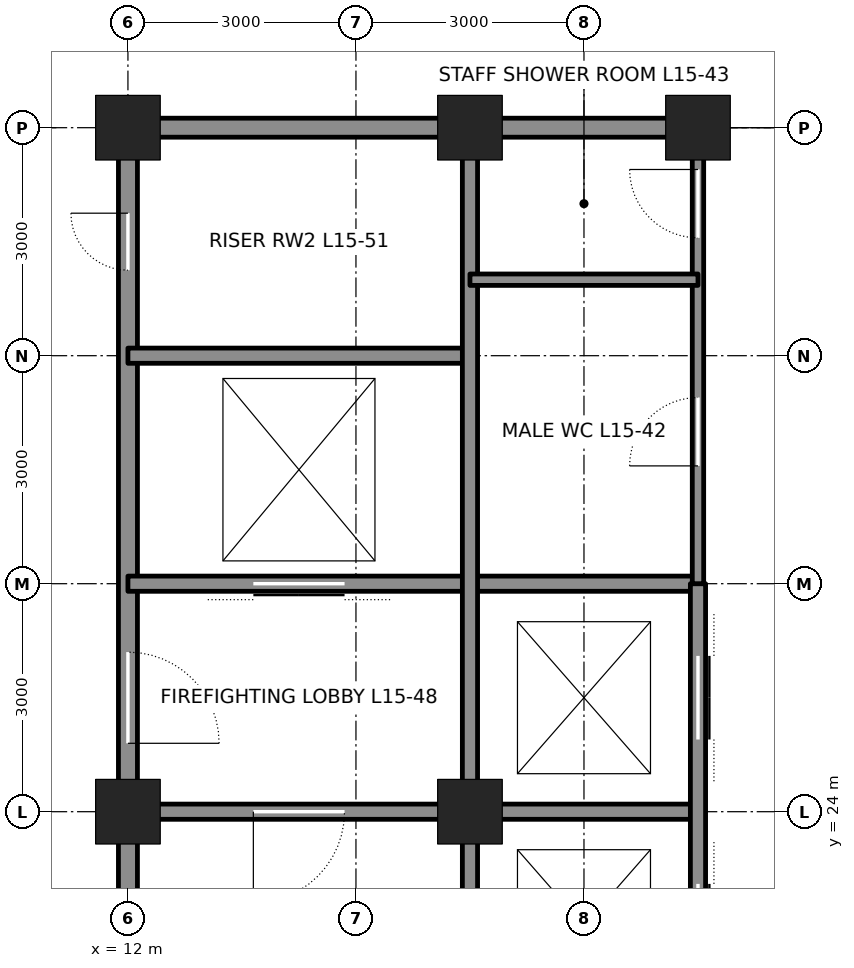
"""IFC4 building model, lengths in metres.
Left out: names, types, materials, properties, quantities, classifications, styles, units other than length and angle.
Written with IfcOpenShell. Run it as: python <this file> out.ifc"""

import sys

from ifc_helpers import new_model, si_unit, direction, frame, frame_2d, origin, origin_2d, place, context, subcontext, project, spatial, rectangle, hollow_rectangle, extrude, element, fill, save


model = new_model("IFC4")
c1 = context("Model", 3, precision=1e-05, world=origin(), true_north=direction((0.0, 1.0)))
c2 = subcontext(c1, "Body", "Model", "MODEL_VIEW")
j1 = project(units=[si_unit("LENGTHUNIT", "METRE"), si_unit("PLANEANGLEUNIT", "RADIAN")], contexts=[c1])
p1 = place(None, origin())
s1 = spatial("IfcSite", under=j1, at=p1, CompositionType="ELEMENT")
p2 = place(p1, origin())
s2 = spatial("IfcBuilding", under=s1, at=p2, CompositionType="ELEMENT")
p3 = place(p2, frame((0.0, 0.0, 73.8)))
s3 = spatial("IfcBuildingStorey", under=s2, at=p3, CompositionType="ELEMENT", Elevation=73.8)
for number, where, z_axis, x_axis in (
    (1, (12.0, 33.0, 0.0), (0.0, 0.0, 1.0), (1.0, 0.0, 0.0)),
    (2, (16.5, 33.0, 0.0), (0.0, 0.0, 1.0), (1.0, 0.0, 0.0)),
    (3, (19.5, 33.0, 0.0), (0.0, 0.0, 1.0), (1.0, 0.0, 0.0)),
    (4, (12.0, 24.0, 0.0), (0.0, 0.0, 1.0), (1.0, 0.0, 0.0)),
    (5, (16.5, 24.0, 0.0), (0.0, 0.0, 1.0), (1.0, 0.0, 0.0)),
):
    element("IfcColumn", number, at=place(p3, frame(where, z_axis=z_axis, x_axis=x_axis)), inside=s3, PredefinedType="COLUMN", context=c2, shape_type="SweptSolid", body=[
        extrude(hollow_rectangle(XDim=0.85, YDim=0.85, WallThickness=0.085, at=origin_2d()), origin(), (0.0, 0.0, 1.0), 4.5),
    ])
p4 = place(p3, frame((12.0, 21.25, 0.0), z_axis=(0.0, 0.0, 1.0), x_axis=(0.0, 1.0, 0.0)))
e6 = element("IfcWall", 6, at=p4, inside=s3, PredefinedType="SOLIDWALL", context=c2, shape_type="SweptSolid", body=[
    extrude(rectangle(XDim=2.5, YDim=0.25, at=frame_2d((1.25, 0.0))), origin(), (0.0, 0.0, 1.0), 3.113),
])
p5 = place(p3, frame((12.0, 24.25, 0.0), z_axis=(0.0, 0.0, 1.0), x_axis=(0.0, 1.0, 0.0)))
e7 = element("IfcWall", 7, at=p5, inside=s3, PredefinedType="SOLIDWALL", context=c2, shape_type="SweptSolid", body=[
    extrude(rectangle(XDim=8.5, YDim=0.25, at=frame_2d((4.25, 0.0))), origin(), (0.0, 0.0, 1.0), 3.113),
])
p6 = place(p5, frame((0.65, 0.0, 0.0)))
e8 = element("IfcOpeningElement", 8, at=p6, cuts=e7, PredefinedType="OPENING", context=c2, shape_type="SweptSolid", body=[
    extrude(rectangle(XDim=1.2, YDim=2.1, at=frame_2d((0.6, 1.05))), frame((0.0, 0.135, 0.0), z_axis=(0.0, -1.0, 0.0), x_axis=(1.0, 0.0, 0.0)), (0.0, 0.0, 1.0), 0.27),
])
p7 = place(p5, frame((6.875, 0.0, 0.0)))
e9 = element("IfcOpeningElement", 9, at=p7, cuts=e7, PredefinedType="OPENING", context=c2, shape_type="SweptSolid", body=[
    extrude(rectangle(XDim=0.75, YDim=2.1, at=frame_2d((0.375, 1.05))), frame((0.0, 0.135, 0.0), z_axis=(0.0, -1.0, 0.0), x_axis=(1.0, 0.0, 0.0)), (0.0, 0.0, 1.0), 0.27),
])
p8 = place(p3, frame((12.25, 24.0, 0.0), z_axis=(0.0, 0.0, 1.0), x_axis=(1.0, 0.0, 0.0)))
e10 = element("IfcWall", 10, at=p8, inside=s3, PredefinedType="SOLIDWALL", context=c2, shape_type="SweptSolid", body=[
    extrude(rectangle(XDim=4.0, YDim=0.2, at=frame_2d((2.0, 0.0))), origin(), (0.0, 0.0, 1.0), 3.39),
])
p9 = place(p8, frame((1.4, 0.0, 0.0)))
e11 = element("IfcOpeningElement", 11, at=p9, cuts=e10, PredefinedType="OPENING", context=c2, shape_type="SweptSolid", body=[
    extrude(rectangle(XDim=1.2, YDim=2.1, at=frame_2d((0.6, 1.05))), frame((0.0, 0.11, 0.0), z_axis=(0.0, -1.0, 0.0), x_axis=(1.0, 0.0, 0.0)), (0.0, 0.0, 1.0), 0.22),
])
p10 = place(p3, frame((16.75, 24.0, 0.0), z_axis=(0.0, 0.0, 1.0), x_axis=(1.0, 0.0, 0.0)))
e12 = element("IfcWall", 12, at=p10, inside=s3, PredefinedType="SOLIDWALL", context=c2, shape_type="SweptSolid", body=[
    extrude(rectangle(XDim=2.75, YDim=0.2, at=frame_2d((1.375, 0.0))), origin(), (0.0, 0.0, 1.0), 3.39),
])
p11 = place(p3, frame((12.0, 27.0, 0.0), z_axis=(0.0, 0.0, 1.0), x_axis=(1.0, 0.0, 0.0)))
e13 = element("IfcWall", 13, at=p11, inside=s3, PredefinedType="SOLIDWALL", context=c2, shape_type="SweptSolid", body=[
    extrude(rectangle(XDim=7.5, YDim=0.2, at=frame_2d((3.75, 0.0))), origin(), (0.0, 0.0, 1.0), 4.34),
])
p12 = place(p11, frame((1.65, 0.0, 0.0)))
e14 = element("IfcOpeningElement", 14, at=p12, cuts=e13, PredefinedType="OPENING", context=c2, shape_type="SweptSolid", body=[
    extrude(rectangle(XDim=1.2, YDim=2.1, at=frame_2d((0.6, 1.05))), frame((0.0, 0.11, 0.0), z_axis=(0.0, -1.0, 0.0), x_axis=(1.0, 0.0, 0.0)), (0.0, 0.0, 1.0), 0.22),
])
p13 = place(p3, frame((12.0, 30.0, 0.0), z_axis=(0.0, 0.0, 1.0), x_axis=(1.0, 0.0, 0.0)))
e15 = element("IfcWall", 15, at=p13, inside=s3, PredefinedType="SOLIDWALL", context=c2, shape_type="SweptSolid", body=[
    extrude(rectangle(XDim=4.5, YDim=0.2, at=frame_2d((2.25, 0.0))), origin(), (0.0, 0.0, 1.0), 4.34),
])
p14 = place(p3, frame((12.25, 33.0, 0.0), z_axis=(0.0, 0.0, 1.0), x_axis=(1.0, 0.0, 0.0)))
e16 = element("IfcWall", 16, at=p14, inside=s3, PredefinedType="SOLIDWALL", context=c2, shape_type="SweptSolid", body=[
    extrude(rectangle(XDim=4.0, YDim=0.25, at=frame_2d((2.0, 0.0))), origin(), (0.0, 0.0, 1.0), 3.181),
])
p15 = place(p3, frame((16.75, 33.0, 0.0), z_axis=(0.0, 0.0, 1.0), x_axis=(1.0, 0.0, 0.0)))
e17 = element("IfcWall", 17, at=p15, inside=s3, PredefinedType="SOLIDWALL", context=c2, shape_type="SweptSolid", body=[
    extrude(rectangle(XDim=2.5, YDim=0.25, at=frame_2d((1.25, 0.0))), origin(), (0.0, 0.0, 1.0), 3.181),
])
p16 = place(p3, frame((16.5, 21.25, 0.0), z_axis=(0.0, 0.0, 1.0), x_axis=(0.0, 1.0, 0.0)))
e18 = element("IfcWall", 18, at=p16, inside=s3, PredefinedType="SOLIDWALL", context=c2, shape_type="SweptSolid", body=[
    extrude(rectangle(XDim=2.5, YDim=0.2, at=frame_2d((1.25, 0.0))), origin(), (0.0, 0.0, 1.0), 3.413),
])
p17 = place(p3, frame((16.5, 24.25, 0.0), z_axis=(0.0, 0.0, 1.0), x_axis=(0.0, 1.0, 0.0)))
e19 = element("IfcWall", 19, at=p17, inside=s3, PredefinedType="SOLIDWALL", context=c2, shape_type="SweptSolid", body=[
    extrude(rectangle(XDim=8.5, YDim=0.2, at=frame_2d((4.25, 0.0))), origin(), (0.0, 0.0, 1.0), 3.413),
])
p18 = place(p3, frame((19.5, 15.0, 0.0), z_axis=(0.0, 0.0, 1.0), x_axis=(0.0, 1.0, 0.0)))
e20 = element("IfcWall", 20, at=p18, inside=s3, PredefinedType="SOLIDWALL", context=c2, shape_type="SweptSolid", body=[
    extrude(rectangle(XDim=12.0, YDim=0.2, at=frame_2d((6.0, 0.0))), origin(), (0.0, 0.0, 1.0), 3.365),
])
p19 = place(p18, frame((0.95, 0.0, 0.0)))
e21 = element("IfcOpeningElement", 21, at=p19, cuts=e20, PredefinedType="OPENING", context=c2, shape_type="SweptSolid", body=[
    extrude(rectangle(XDim=1.1, YDim=2.1, at=frame_2d((0.55, 1.05))), frame((0.0, 0.11, 0.0), z_axis=(0.0, -1.0, 0.0), x_axis=(1.0, 0.0, 0.0)), (0.0, 0.0, 1.0), 0.22),
])
p20 = place(p18, frame((3.95, 0.0, 0.0)))
e22 = element("IfcOpeningElement", 22, at=p20, cuts=e20, PredefinedType="OPENING", context=c2, shape_type="SweptSolid", body=[
    extrude(rectangle(XDim=1.1, YDim=2.1, at=frame_2d((0.55, 1.05))), frame((0.0, 0.11, 0.0), z_axis=(0.0, -1.0, 0.0), x_axis=(1.0, 0.0, 0.0)), (0.0, 0.0, 1.0), 0.22),
])
p21 = place(p18, frame((6.95, 0.0, 0.0)))
e23 = element("IfcOpeningElement", 23, at=p21, cuts=e20, PredefinedType="OPENING", context=c2, shape_type="SweptSolid", body=[
    extrude(rectangle(XDim=1.1, YDim=2.1, at=frame_2d((0.55, 1.05))), frame((0.0, 0.11, 0.0), z_axis=(0.0, -1.0, 0.0), x_axis=(1.0, 0.0, 0.0)), (0.0, 0.0, 1.0), 0.22),
])
p22 = place(p18, frame((9.95, 0.0, 0.0)))
e24 = element("IfcOpeningElement", 24, at=p22, cuts=e20, PredefinedType="OPENING", context=c2, shape_type="SweptSolid", body=[
    extrude(rectangle(XDim=1.1, YDim=2.1, at=frame_2d((0.55, 1.05))), frame((0.0, 0.11, 0.0), z_axis=(0.0, -1.0, 0.0), x_axis=(1.0, 0.0, 0.0)), (0.0, 0.0, 1.0), 0.22),
])
p23 = place(p3, frame((19.5, 27.0, 0.0), z_axis=(0.0, 0.0, 1.0), x_axis=(0.0, 1.0, 0.0)))
e25 = element("IfcWall", 25, at=p23, inside=s3, PredefinedType="PARTITIONING", context=c2, shape_type="SweptSolid", body=[
    extrude(rectangle(XDim=5.75, YDim=0.15, at=frame_2d((2.875, 0.0))), origin(), (0.0, 0.0, 1.0), 3.365),
])
p24 = place(p23, frame((1.55, 0.0, 0.0)))
e26 = element("IfcOpeningElement", 26, at=p24, cuts=e25, PredefinedType="OPENING", context=c2, shape_type="SweptSolid", body=[
    extrude(rectangle(XDim=0.9, YDim=2.1, at=frame_2d((0.45, 1.05))), frame((0.0, 0.085, 0.0), z_axis=(0.0, -1.0, 0.0), x_axis=(1.0, 0.0, 0.0)), (0.0, 0.0, 1.0), 0.17),
])
p25 = place(p23, frame((4.55, 0.0, 0.0)))
e27 = element("IfcOpeningElement", 27, at=p25, cuts=e25, PredefinedType="OPENING", context=c2, shape_type="SweptSolid", body=[
    extrude(rectangle(XDim=0.9, YDim=2.1, at=frame_2d((0.45, 1.05))), frame((0.0, 0.085, 0.0), z_axis=(0.0, -1.0, 0.0), x_axis=(1.0, 0.0, 0.0)), (0.0, 0.0, 1.0), 0.17),
])
p26 = place(p3, frame((16.5, 31.0, 0.0), z_axis=(0.0, 0.0, 1.0), x_axis=(1.0, 0.0, 0.0)))
e28 = element("IfcWall", 28, at=p26, inside=s3, PredefinedType="PARTITIONING", context=c2, shape_type="SweptSolid", body=[
    extrude(rectangle(XDim=3.0, YDim=0.15, at=frame_2d((1.5, 0.0))), origin(), (0.0, 0.0, 1.0), 4.34),
])
p27 = place(p9, frame((1.2, 0.0, 0.0), z_axis=(0.0, 0.0, 1.0), x_axis=(-1.0, 0.0, 0.0)))
e29 = element("IfcDoor", 29, at=p27, inside=s3, OperationType="SINGLE_SWING_RIGHT", PredefinedType="DOOR", context=c2, shape_type="SweptSolid", body=[
    extrude(rectangle(XDim=1.2, YDim=2.1, at=frame_2d((0.6, 1.05))), frame((0.0, 0.025, 0.0), z_axis=(0.0, -1.0, 0.0), x_axis=(1.0, 0.0, 0.0)), (0.0, 0.0, 1.0), 0.05),
])
fill(e11, e29)
p28 = place(p6, frame((1.2, 0.0, 0.0), z_axis=(0.0, 0.0, 1.0), x_axis=(-1.0, 0.0, 0.0)))
e30 = element("IfcDoor", 30, at=p28, inside=s3, OperationType="SINGLE_SWING_RIGHT", PredefinedType="DOOR", context=c2, shape_type="SweptSolid", body=[
    extrude(rectangle(XDim=1.2, YDim=2.1, at=frame_2d((0.6, 1.05))), frame((0.0, 0.025, 0.0), z_axis=(0.0, -1.0, 0.0), x_axis=(1.0, 0.0, 0.0)), (0.0, 0.0, 1.0), 0.05),
])
fill(e8, e30)
p29 = place(p12, origin())
e31 = element("IfcDoor", 31, at=p29, inside=s3, OperationType="DOUBLE_DOOR_SLIDING", PredefinedType="DOOR", context=c2, shape_type="SweptSolid", body=[
    extrude(rectangle(XDim=1.2, YDim=2.1, at=frame_2d((0.6, 1.05))), frame((0.0, 0.025, 0.0), z_axis=(0.0, -1.0, 0.0), x_axis=(1.0, 0.0, 0.0)), (0.0, 0.0, 1.0), 0.05),
])
fill(e14, e31)
p30 = place(p7, origin())
e32 = element("IfcDoor", 32, at=p30, inside=s3, OperationType="SINGLE_SWING_RIGHT", PredefinedType="DOOR", context=c2, shape_type="SweptSolid", body=[
    extrude(rectangle(XDim=0.75, YDim=2.1, at=frame_2d((0.375, 1.05))), frame((0.0, 0.025, 0.0), z_axis=(0.0, -1.0, 0.0), x_axis=(1.0, 0.0, 0.0)), (0.0, 0.0, 1.0), 0.05),
])
fill(e9, e32)
p31 = place(p24, origin())
e33 = element("IfcDoor", 33, at=p31, inside=s3, OperationType="SINGLE_SWING_LEFT", PredefinedType="DOOR", context=c2, shape_type="SweptSolid", body=[
    extrude(rectangle(XDim=0.9, YDim=2.1, at=frame_2d((0.45, 1.05))), frame((0.0, 0.025, 0.0), z_axis=(0.0, -1.0, 0.0), x_axis=(1.0, 0.0, 0.0)), (0.0, 0.0, 1.0), 0.05),
])
fill(e26, e33)
p32 = place(p25, origin())
e34 = element("IfcDoor", 34, at=p32, inside=s3, OperationType="SINGLE_SWING_RIGHT", PredefinedType="DOOR", context=c2, shape_type="SweptSolid", body=[
    extrude(rectangle(XDim=0.9, YDim=2.1, at=frame_2d((0.45, 1.05))), frame((0.0, 0.025, 0.0), z_axis=(0.0, -1.0, 0.0), x_axis=(1.0, 0.0, 0.0)), (0.0, 0.0, 1.0), 0.05),
])
fill(e27, e34)
p33 = place(p21, origin())
e35 = element("IfcDoor", 35, at=p33, inside=s3, OperationType="DOUBLE_DOOR_SLIDING", PredefinedType="DOOR", context=c2, shape_type="SweptSolid", body=[
    extrude(rectangle(XDim=1.1, YDim=2.1, at=frame_2d((0.55, 1.05))), frame((0.0, 0.025, 0.0), z_axis=(0.0, -1.0, 0.0), x_axis=(1.0, 0.0, 0.0)), (0.0, 0.0, 1.0), 0.05),
])
fill(e23, e35)
p34 = place(p22, origin())
e36 = element("IfcDoor", 36, at=p34, inside=s3, OperationType="DOUBLE_DOOR_SLIDING", PredefinedType="DOOR", context=c2, shape_type="SweptSolid", body=[
    extrude(rectangle(XDim=1.1, YDim=2.1, at=frame_2d((0.55, 1.05))), frame((0.0, 0.025, 0.0), z_axis=(0.0, -1.0, 0.0), x_axis=(1.0, 0.0, 0.0)), (0.0, 0.0, 1.0), 0.05),
])
fill(e24, e36)
save(model, sys.argv[1])
